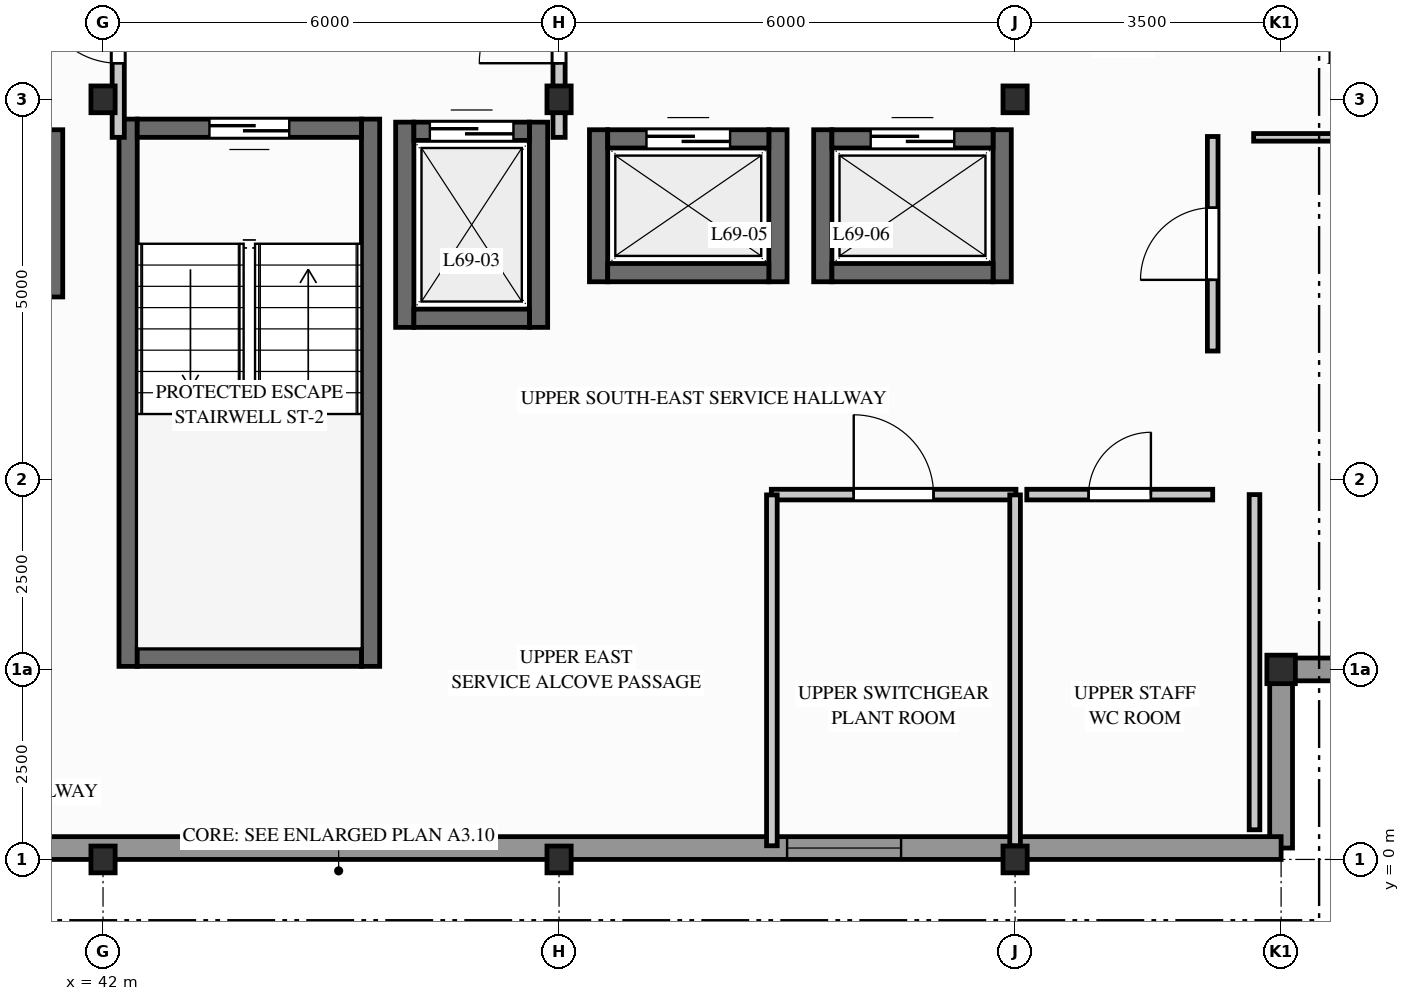
"""IFC4 building model, lengths in metres.
Left out: names, types, materials, properties, quantities, classifications, styles, units other than length and angle.
Written with IfcOpenShell. Run it as: python <this file> out.ifc"""

import sys

from ifc_helpers import new_model, si_unit, direction, frame, frame_2d, origin, origin_2d, place, context, subcontext, project, spatial, rectangle, i_section, extrude, element, fill, save


model = new_model("IFC4")
c1 = context("Model", 3, precision=1e-05, world=origin(), true_north=direction((0.0, 1.0)))
c2 = subcontext(c1, "Body", "Model", "MODEL_VIEW")
j1 = project(units=[si_unit("LENGTHUNIT", "METRE"), si_unit("PLANEANGLEUNIT", "RADIAN")], contexts=[c1])
p1 = place(None, origin())
s1 = spatial("IfcSite", under=j1, at=p1, CompositionType="ELEMENT")
p2 = place(p1, origin())
s2 = spatial("IfcBuilding", under=s1, at=p2, CompositionType="ELEMENT")
p3 = place(p2, frame((0.0, 0.0, 227.3)))
s3 = spatial("IfcBuildingStorey", under=s2, at=p3, CompositionType="ELEMENT", Elevation=227.3)
for number, where, z_axis, x_axis in (
    (1, (42.0, 0.0, 0.0), (0.0, 0.0, 1.0), (1.0, 0.0, 0.0)),
    (2, (42.0, 10.0, 0.0), (0.0, 0.0, 1.0), (1.0, 0.0, 0.0)),
    (3, (48.0, 0.0, 0.0), (0.0, 0.0, 1.0), (1.0, 0.0, 0.0)),
    (4, (48.0, 10.0, 0.0), (0.0, 0.0, 1.0), (1.0, 0.0, 0.0)),
    (5, (54.0, 0.0, 0.0), (0.0, 0.0, 1.0), (1.0, 0.0, 0.0)),
    (6, (54.0, 10.0, 0.0), (0.0, 0.0, 1.0), (1.0, 0.0, 0.0)),
):
    element("IfcColumn", number, at=place(p3, frame(where, z_axis=z_axis, x_axis=x_axis)), inside=s3, PredefinedType="COLUMN", context=c2, shape_type="SweptSolid", body=[
        extrude(i_section(OverallWidth=0.318, OverallDepth=0.353, WebThickness=0.023, FlangeThickness=0.038, FilletRadius=0.015, at=origin_2d()), origin(), (0.0, 0.0, 1.0), 3.1),
    ])
p4 = place(p3, frame((57.5, 2.5, 0.0), z_axis=(0.0, 0.0, 1.0), x_axis=(1.0, 0.0, 0.0)))
e7 = element("IfcColumn", 7, at=p4, inside=s3, PredefinedType="COLUMN", context=c2, shape_type="SweptSolid", body=[
    extrude(i_section(OverallWidth=0.375, OverallDepth=0.375, WebThickness=0.017, FlangeThickness=0.027, FilletRadius=0.015, at=origin_2d()), origin(), (0.0, 0.0, 1.0), 3.1),
])
for number, where, z_axis, x_axis in (
    (8, (57.5, 0.15, 0.0), (0.0, 0.0, 1.0), (0.0, 1.0, 0.0)),
    (9, (57.5, 2.5, 0.0), (0.0, 0.0, 1.0), (1.0, 0.0, 0.0)),
):
    element("IfcWall", number, at=place(p3, frame(where, z_axis=z_axis, x_axis=x_axis)), inside=s3, PredefinedType="STANDARD", context=c2, shape_type="SweptSolid", body=[
        extrude(rectangle(XDim=2.35, YDim=0.3, at=frame_2d((1.175, 0.0))), origin(), (0.0, 0.0, 1.0), 2.89),
    ])
p5 = place(p3, frame((29.75, 0.15, 0.0), z_axis=(0.0, 0.0, 1.0), x_axis=(1.0, 0.0, 0.0)))
e10 = element("IfcWall", 10, at=p5, inside=s3, PredefinedType="STANDARD", context=c2, shape_type="SweptSolid", body=[
    extrude(rectangle(XDim=27.75, YDim=0.3, at=frame_2d((13.875, 0.0))), origin(), (0.0, 0.0, 1.0), 2.332),
])
p6 = place(p5, frame((2.5, 0.0, 0.712)))
e11 = element("IfcOpeningElement", 11, at=p6, cuts=e10, PredefinedType="OPENING", context=c2, shape_type="SweptSolid", body=[
    extrude(rectangle(XDim=0.8, YDim=1.4, at=frame_2d((0.4, 0.7))), frame((0.0, 0.16, 0.0), z_axis=(0.0, -1.0, 0.0), x_axis=(1.0, 0.0, 0.0)), (0.0, 0.0, 1.0), 0.32),
])
p7 = place(p5, frame((21.25, 0.0, 0.312)))
e12 = element("IfcOpeningElement", 12, at=p7, cuts=e10, PredefinedType="OPENING", context=c2, shape_type="SweptSolid", body=[
    extrude(rectangle(XDim=1.5, YDim=1.8, at=frame_2d((0.75, 0.9))), frame((0.0, 0.16, 0.0), z_axis=(0.0, -1.0, 0.0), x_axis=(1.0, 0.0, 0.0)), (0.0, 0.0, 1.0), 0.32),
])
for number, where, z_axis, x_axis in (
    (13, (42.33, 2.54, 0.0), (0.0, 0.0, 1.0), (0.0, 1.0, 0.0)),
    (14, (45.52, 2.54, 0.0), (0.0, 0.0, 1.0), (0.0, 1.0, 0.0)),
):
    element("IfcWall", number, at=place(p3, frame(where, z_axis=z_axis, x_axis=x_axis)), inside=s3, PredefinedType="SHEAR", context=c2, shape_type="SweptSolid", body=[
        extrude(rectangle(XDim=7.2, YDim=0.24, at=frame_2d((3.6, 0.0))), origin(), (0.0, 0.0, 1.0), 2.89),
    ])
p8 = place(p3, frame((42.45, 2.66, 0.0), z_axis=(0.0, 0.0, 1.0), x_axis=(1.0, 0.0, 0.0)))
e15 = element("IfcWall", 15, at=p8, inside=s3, PredefinedType="SHEAR", context=c2, shape_type="SweptSolid", body=[
    extrude(rectangle(XDim=2.95, YDim=0.24, at=frame_2d((1.475, 0.0))), origin(), (0.0, 0.0, 1.0), 2.89),
])
p9 = place(p3, frame((45.4, 9.62, 0.0), z_axis=(0.0, 0.0, 1.0), x_axis=(-1.0, 0.0, 0.0)))
e16 = element("IfcWall", 16, at=p9, inside=s3, PredefinedType="SHEAR", context=c2, shape_type="SweptSolid", body=[
    extrude(rectangle(XDim=2.95, YDim=0.24, at=frame_2d((1.475, 0.0))), origin(), (0.0, 0.0, 1.0), 2.89),
])
p10 = place(p9, frame((0.95, 0.0, 0.0)))
e17 = element("IfcOpeningElement", 17, at=p10, cuts=e16, PredefinedType="OPENING", context=c2, shape_type="SweptSolid", body=[
    extrude(rectangle(XDim=1.05, YDim=2.06, at=frame_2d((0.525, 1.03))), frame((0.0, 0.13, 0.0), z_axis=(0.0, -1.0, 0.0), x_axis=(1.0, 0.0, 0.0)), (0.0, 0.0, 1.0), 0.26),
])
for number, where, z_axis, x_axis in (
    (18, (45.97, 7.0, 0.0), (0.0, 0.0, 1.0), (0.0, 1.0, 0.0)),
    (19, (47.73, 7.0, 0.0), (0.0, 0.0, 1.0), (0.0, 1.0, 0.0)),
):
    element("IfcWall", number, at=place(p3, frame(where, z_axis=z_axis, x_axis=x_axis)), inside=s3, PredefinedType="SHEAR", context=c2, shape_type="SweptSolid", body=[
        extrude(rectangle(XDim=2.7, YDim=0.24, at=frame_2d((1.35, 0.0))), origin(), (0.0, 0.0, 1.0), 2.89),
    ])
p11 = place(p3, frame((46.09, 7.12, 0.0), z_axis=(0.0, 0.0, 1.0), x_axis=(1.0, 0.0, 0.0)))
e20 = element("IfcWall", 20, at=p11, inside=s3, PredefinedType="SHEAR", context=c2, shape_type="SweptSolid", body=[
    extrude(rectangle(XDim=1.52, YDim=0.24, at=frame_2d((0.76, 0.0))), origin(), (0.0, 0.0, 1.0), 2.89),
])
p12 = place(p3, frame((46.09, 9.58, 0.0), z_axis=(0.0, 0.0, 1.0), x_axis=(1.0, 0.0, 0.0)))
e21 = element("IfcWall", 21, at=p12, inside=s3, PredefinedType="SHEAR", context=c2, shape_type="SweptSolid", body=[
    extrude(rectangle(XDim=1.52, YDim=0.24, at=frame_2d((0.76, 0.0))), origin(), (0.0, 0.0, 1.0), 2.89),
])
p13 = place(p12, frame((0.21, 0.0, 0.0)))
e22 = element("IfcOpeningElement", 22, at=p13, cuts=e21, PredefinedType="OPENING", context=c2, shape_type="SweptSolid", body=[
    extrude(rectangle(XDim=1.1, YDim=2.06, at=frame_2d((0.55, 1.03))), frame((0.0, 0.13, 0.0), z_axis=(0.0, -1.0, 0.0), x_axis=(1.0, 0.0, 0.0)), (0.0, 0.0, 1.0), 0.26),
])
p14 = place(p3, frame((41.35, 7.4, 0.0), z_axis=(0.0, 0.0, 1.0), x_axis=(0.0, 1.0, 0.0)))
e23 = element("IfcWall", 23, at=p14, inside=s3, PredefinedType="SHEAR", context=c2, shape_type="SweptSolid", body=[
    extrude(rectangle(XDim=2.2, YDim=0.24, at=frame_2d((1.1, 0.0))), origin(), (0.0, 0.0, 1.0), 2.89),
])
for number, where, z_axis, x_axis in (
    (24, (48.52, 7.6, 0.0), (0.0, 0.0, 1.0), (0.0, 1.0, 0.0)),
    (25, (50.88, 7.6, 0.0), (0.0, 0.0, 1.0), (0.0, 1.0, 0.0)),
):
    element("IfcWall", number, at=place(p3, frame(where, z_axis=z_axis, x_axis=x_axis)), inside=s3, PredefinedType="SHEAR", context=c2, shape_type="SweptSolid", body=[
        extrude(rectangle(XDim=2.0, YDim=0.24, at=frame_2d((1.0, 0.0))), origin(), (0.0, 0.0, 1.0), 2.89),
    ])
p15 = place(p3, frame((48.64, 7.72, 0.0), z_axis=(0.0, 0.0, 1.0), x_axis=(1.0, 0.0, 0.0)))
e26 = element("IfcWall", 26, at=p15, inside=s3, PredefinedType="SHEAR", context=c2, shape_type="SweptSolid", body=[
    extrude(rectangle(XDim=2.12, YDim=0.24, at=frame_2d((1.06, 0.0))), origin(), (0.0, 0.0, 1.0), 2.89),
])
p16 = place(p3, frame((48.64, 9.48, 0.0), z_axis=(0.0, 0.0, 1.0), x_axis=(1.0, 0.0, 0.0)))
e27 = element("IfcWall", 27, at=p16, inside=s3, PredefinedType="SHEAR", context=c2, shape_type="SweptSolid", body=[
    extrude(rectangle(XDim=2.12, YDim=0.24, at=frame_2d((1.06, 0.0))), origin(), (0.0, 0.0, 1.0), 2.89),
])
p17 = place(p16, frame((0.51, 0.0, 0.0)))
e28 = element("IfcOpeningElement", 28, at=p17, cuts=e27, PredefinedType="OPENING", context=c2, shape_type="SweptSolid", body=[
    extrude(rectangle(XDim=1.1, YDim=2.06, at=frame_2d((0.55, 1.03))), frame((0.0, 0.13, 0.0), z_axis=(0.0, -1.0, 0.0), x_axis=(1.0, 0.0, 0.0)), (0.0, 0.0, 1.0), 0.26),
])
for number, where, z_axis, x_axis in (
    (29, (51.47, 7.6, 0.0), (0.0, 0.0, 1.0), (0.0, 1.0, 0.0)),
    (30, (53.83, 7.6, 0.0), (0.0, 0.0, 1.0), (0.0, 1.0, 0.0)),
):
    element("IfcWall", number, at=place(p3, frame(where, z_axis=z_axis, x_axis=x_axis)), inside=s3, PredefinedType="SHEAR", context=c2, shape_type="SweptSolid", body=[
        extrude(rectangle(XDim=2.0, YDim=0.24, at=frame_2d((1.0, 0.0))), origin(), (0.0, 0.0, 1.0), 2.89),
    ])
p18 = place(p3, frame((51.59, 7.72, 0.0), z_axis=(0.0, 0.0, 1.0), x_axis=(1.0, 0.0, 0.0)))
e31 = element("IfcWall", 31, at=p18, inside=s3, PredefinedType="SHEAR", context=c2, shape_type="SweptSolid", body=[
    extrude(rectangle(XDim=2.12, YDim=0.24, at=frame_2d((1.06, 0.0))), origin(), (0.0, 0.0, 1.0), 2.89),
])
p19 = place(p3, frame((51.59, 9.48, 0.0), z_axis=(0.0, 0.0, 1.0), x_axis=(1.0, 0.0, 0.0)))
e32 = element("IfcWall", 32, at=p19, inside=s3, PredefinedType="SHEAR", context=c2, shape_type="SweptSolid", body=[
    extrude(rectangle(XDim=2.12, YDim=0.24, at=frame_2d((1.06, 0.0))), origin(), (0.0, 0.0, 1.0), 2.89),
])
p20 = place(p19, frame((0.51, 0.0, 0.0)))
e33 = element("IfcOpeningElement", 33, at=p20, cuts=e32, PredefinedType="OPENING", context=c2, shape_type="SweptSolid", body=[
    extrude(rectangle(XDim=1.1, YDim=2.06, at=frame_2d((0.55, 1.03))), frame((0.0, 0.13, 0.0), z_axis=(0.0, -1.0, 0.0), x_axis=(1.0, 0.0, 0.0)), (0.0, 0.0, 1.0), 0.26),
])
p21 = place(p3, frame((50.793, 4.8, 0.0), z_axis=(0.0, 0.0, 1.0), x_axis=(1.0, 0.0, 0.0)))
e34 = element("IfcWall", 34, at=p21, inside=s3, PredefinedType="PARTITIONING", context=c2, shape_type="SweptSolid", body=[
    extrude(rectangle(XDim=3.219, YDim=0.14, at=frame_2d((1.609, 0.0))), origin(), (0.0, 0.0, 1.0), 2.325),
])
p22 = place(p21, frame((1.084, 0.0, 0.0)))
e35 = element("IfcOpeningElement", 35, at=p22, cuts=e34, PredefinedType="OPENING", context=c2, shape_type="SweptSolid", body=[
    extrude(rectangle(XDim=1.05, YDim=2.06, at=frame_2d((0.525, 1.03))), frame((0.0, 0.08, 0.0), z_axis=(0.0, -1.0, 0.0), x_axis=(1.0, 0.0, 0.0)), (0.0, 0.0, 1.0), 0.16),
])
p23 = place(p3, frame((54.154, 4.8, 0.0), z_axis=(0.0, 0.0, 1.0), x_axis=(1.0, 0.0, 0.0)))
e36 = element("IfcWall", 36, at=p23, inside=s3, PredefinedType="PARTITIONING", context=c2, shape_type="SweptSolid", body=[
    extrude(rectangle(XDim=2.446, YDim=0.14, at=frame_2d((1.223, 0.0))), origin(), (0.0, 0.0, 1.0), 2.89),
])
p24 = place(p23, frame((0.813, 0.0, 0.0)))
e37 = element("IfcOpeningElement", 37, at=p24, cuts=e36, PredefinedType="OPENING", context=c2, shape_type="SweptSolid", body=[
    extrude(rectangle(XDim=0.82, YDim=2.02, at=frame_2d((0.41, 1.01))), frame((0.0, 0.08, 0.0), z_axis=(0.0, -1.0, 0.0), x_axis=(1.0, 0.0, 0.0)), (0.0, 0.0, 1.0), 0.16),
])
p25 = place(p3, frame((56.6, 6.689, 0.0), z_axis=(0.0, 0.0, 1.0), x_axis=(0.0, 1.0, 0.0)))
e38 = element("IfcWall", 38, at=p25, inside=s3, PredefinedType="PARTITIONING", context=c2, shape_type="SweptSolid", body=[
    extrude(rectangle(XDim=2.823, YDim=0.14, at=frame_2d((1.411, 0.0))), origin(), (0.0, 0.0, 1.0), 2.89),
])
p26 = place(p25, frame((0.936, 0.0, 0.0)))
e39 = element("IfcOpeningElement", 39, at=p26, cuts=e38, PredefinedType="OPENING", context=c2, shape_type="SweptSolid", body=[
    extrude(rectangle(XDim=0.95, YDim=2.05, at=frame_2d((0.475, 1.025))), frame((0.0, 0.08, 0.0), z_axis=(0.0, -1.0, 0.0), x_axis=(1.0, 0.0, 0.0)), (0.0, 0.0, 1.0), 0.16),
])
p27 = place(p3, frame((50.8, 0.18, 0.0), z_axis=(0.0, 0.0, 1.0), x_axis=(0.0, 1.0, 0.0)))
e40 = element("IfcWall", 40, at=p27, inside=s3, PredefinedType="PARTITIONING", context=c2, shape_type="SweptSolid", body=[
    extrude(rectangle(XDim=4.616, YDim=0.14, at=frame_2d((2.308, 0.0))), origin(), (0.0, 0.0, 1.0), 2.89),
])
p28 = place(p3, frame((54.0, 0.18, 0.0), z_axis=(0.0, 0.0, 1.0), x_axis=(0.0, 1.0, 0.0)))
e41 = element("IfcWall", 41, at=p28, inside=s3, PredefinedType="PARTITIONING", context=c2, shape_type="SweptSolid", body=[
    extrude(rectangle(XDim=4.616, YDim=0.14, at=frame_2d((2.308, 0.0))), origin(), (0.0, 0.0, 1.0), 2.325),
])
p29 = place(p3, frame((42.2, 9.5, 0.0), z_axis=(0.0, 0.0, 1.0), x_axis=(0.0, 1.0, 0.0)))
e42 = element("IfcWall", 42, at=p29, inside=s3, PredefinedType="PARTITIONING", context=c2, shape_type="SweptSolid", body=[
    extrude(rectangle(XDim=3.0, YDim=0.16, at=frame_2d((1.5, 0.0))), origin(), (0.0, 0.0, 1.0), 2.325),
])
p30 = place(p29, frame((0.975, 0.0, 0.0)))
e43 = element("IfcOpeningElement", 43, at=p30, cuts=e42, PredefinedType="OPENING", context=c2, shape_type="SweptSolid", body=[
    extrude(rectangle(XDim=1.05, YDim=2.06, at=frame_2d((0.525, 1.03))), frame((0.0, 0.09, 0.0), z_axis=(0.0, -1.0, 0.0), x_axis=(1.0, 0.0, 0.0)), (0.0, 0.0, 1.0), 0.18),
])
p31 = place(p3, frame((48.0, 9.5, 0.0), z_axis=(0.0, 0.0, 1.0), x_axis=(0.0, 1.0, 0.0)))
e44 = element("IfcWall", 44, at=p31, inside=s3, PredefinedType="PARTITIONING", context=c2, shape_type="SweptSolid", body=[
    extrude(rectangle(XDim=3.0, YDim=0.16, at=frame_2d((1.5, 0.0))), origin(), (0.0, 0.0, 1.0), 2.325),
])
p32 = place(p31, frame((0.975, 0.0, 0.0)))
e45 = element("IfcOpeningElement", 45, at=p32, cuts=e44, PredefinedType="OPENING", context=c2, shape_type="SweptSolid", body=[
    extrude(rectangle(XDim=1.05, YDim=2.06, at=frame_2d((0.525, 1.03))), frame((0.0, 0.09, 0.0), z_axis=(0.0, -1.0, 0.0), x_axis=(1.0, 0.0, 0.0)), (0.0, 0.0, 1.0), 0.18),
])
p33 = place(p3, frame((57.139, 9.5, 0.0), z_axis=(0.0, 0.0, 1.0), x_axis=(1.0, 0.0, 0.0)))
e46 = element("IfcWall", 46, at=p33, inside=s3, PredefinedType="PARTITIONING", context=c2, shape_type="SweptSolid", body=[
    extrude(rectangle(XDim=2.661, YDim=0.1, at=frame_2d((1.331, 0.0))), origin(), (0.0, 0.0, 1.0), 2.89),
])
p34 = place(p3, frame((57.15, 0.39, 0.0), z_axis=(0.0, 0.0, 1.0), x_axis=(0.0, 1.0, 0.0)))
e47 = element("IfcWall", 47, at=p34, inside=s3, PredefinedType="PARTITIONING", context=c2, shape_type="SweptSolid", body=[
    extrude(rectangle(XDim=4.41, YDim=0.14, at=frame_2d((2.205, 0.0))), origin(), (0.0, 0.0, 1.0), 2.89),
])
p35 = place(p7, origin())
e48 = element("IfcWindow", 48, at=p35, inside=s3, PartitioningType="SINGLE_PANEL", PredefinedType="WINDOW", context=c2, shape_type="SweptSolid", body=[
    extrude(rectangle(XDim=1.5, YDim=1.8, at=frame_2d((0.75, 0.9))), frame((0.0, 0.03, 0.0), z_axis=(0.0, -1.0, 0.0), x_axis=(1.0, 0.0, 0.0)), (0.0, 0.0, 1.0), 0.06),
])
fill(e12, e48)
p36 = place(p10, origin())
e49 = element("IfcDoor", 49, at=p36, inside=s3, OperationType="SINGLE_SWING_RIGHT", PredefinedType="DOOR", context=c2, shape_type="SweptSolid", body=[
    extrude(rectangle(XDim=1.05, YDim=2.06, at=frame_2d((0.525, 1.03))), frame((0.0, 0.025, 0.0), z_axis=(0.0, -1.0, 0.0), x_axis=(1.0, 0.0, 0.0)), (0.0, 0.0, 1.0), 0.05),
])
fill(e17, e49)
p37 = place(p13, origin())
e50 = element("IfcDoor", 50, at=p37, inside=s3, OperationType="SLIDING_TO_RIGHT", PredefinedType="DOOR", context=c2, shape_type="SweptSolid", body=[
    extrude(rectangle(XDim=1.1, YDim=2.06, at=frame_2d((0.55, 1.03))), frame((0.0, 0.025, 0.0), z_axis=(0.0, -1.0, 0.0), x_axis=(1.0, 0.0, 0.0)), (0.0, 0.0, 1.0), 0.05),
])
fill(e22, e50)
p38 = place(p17, origin())
e51 = element("IfcDoor", 51, at=p38, inside=s3, OperationType="SLIDING_TO_RIGHT", PredefinedType="DOOR", context=c2, shape_type="SweptSolid", body=[
    extrude(rectangle(XDim=1.1, YDim=2.06, at=frame_2d((0.55, 1.03))), frame((0.0, 0.025, 0.0), z_axis=(0.0, -1.0, 0.0), x_axis=(1.0, 0.0, 0.0)), (0.0, 0.0, 1.0), 0.05),
])
fill(e28, e51)
p39 = place(p20, origin())
e52 = element("IfcDoor", 52, at=p39, inside=s3, OperationType="SLIDING_TO_LEFT", PredefinedType="DOOR", context=c2, shape_type="SweptSolid", body=[
    extrude(rectangle(XDim=1.1, YDim=2.06, at=frame_2d((0.55, 1.03))), frame((0.0, 0.025, 0.0), z_axis=(0.0, -1.0, 0.0), x_axis=(1.0, 0.0, 0.0)), (0.0, 0.0, 1.0), 0.05),
])
fill(e33, e52)
p40 = place(p22, origin())
e53 = element("IfcDoor", 53, at=p40, inside=s3, OperationType="SINGLE_SWING_LEFT", PredefinedType="DOOR", context=c2, shape_type="SweptSolid", body=[
    extrude(rectangle(XDim=1.05, YDim=2.06, at=frame_2d((0.525, 1.03))), frame((0.0, 0.025, 0.0), z_axis=(0.0, -1.0, 0.0), x_axis=(1.0, 0.0, 0.0)), (0.0, 0.0, 1.0), 0.05),
])
fill(e35, e53)
p41 = place(p24, origin())
e54 = element("IfcDoor", 54, at=p41, inside=s3, OperationType="SINGLE_SWING_RIGHT", PredefinedType="DOOR", context=c2, shape_type="SweptSolid", body=[
    extrude(rectangle(XDim=0.82, YDim=2.02, at=frame_2d((0.41, 1.01))), frame((0.0, 0.025, 0.0), z_axis=(0.0, -1.0, 0.0), x_axis=(1.0, 0.0, 0.0)), (0.0, 0.0, 1.0), 0.05),
])
fill(e37, e54)
p42 = place(p26, origin())
e55 = element("IfcDoor", 55, at=p42, inside=s3, OperationType="SINGLE_SWING_LEFT", PredefinedType="DOOR", context=c2, shape_type="SweptSolid", body=[
    extrude(rectangle(XDim=0.95, YDim=2.05, at=frame_2d((0.475, 1.025))), frame((0.0, 0.025, 0.0), z_axis=(0.0, -1.0, 0.0), x_axis=(1.0, 0.0, 0.0)), (0.0, 0.0, 1.0), 0.05),
])
fill(e39, e55)
p43 = place(p30, origin())
e56 = element("IfcDoor", 56, at=p43, inside=s3, OperationType="SINGLE_SWING_RIGHT", PredefinedType="DOOR", context=c2, shape_type="SweptSolid", body=[
    extrude(rectangle(XDim=1.05, YDim=2.06, at=frame_2d((0.525, 1.03))), frame((0.0, 0.025, 0.0), z_axis=(0.0, -1.0, 0.0), x_axis=(1.0, 0.0, 0.0)), (0.0, 0.0, 1.0), 0.05),
])
fill(e43, e56)
p44 = place(p32, origin())
e57 = element("IfcDoor", 57, at=p44, inside=s3, OperationType="SINGLE_SWING_LEFT", PredefinedType="DOOR", context=c2, shape_type="SweptSolid", body=[
    extrude(rectangle(XDim=1.05, YDim=2.06, at=frame_2d((0.525, 1.03))), frame((0.0, 0.025, 0.0), z_axis=(0.0, -1.0, 0.0), x_axis=(1.0, 0.0, 0.0)), (0.0, 0.0, 1.0), 0.05),
])
fill(e45, e57)
save(model, sys.argv[1])
